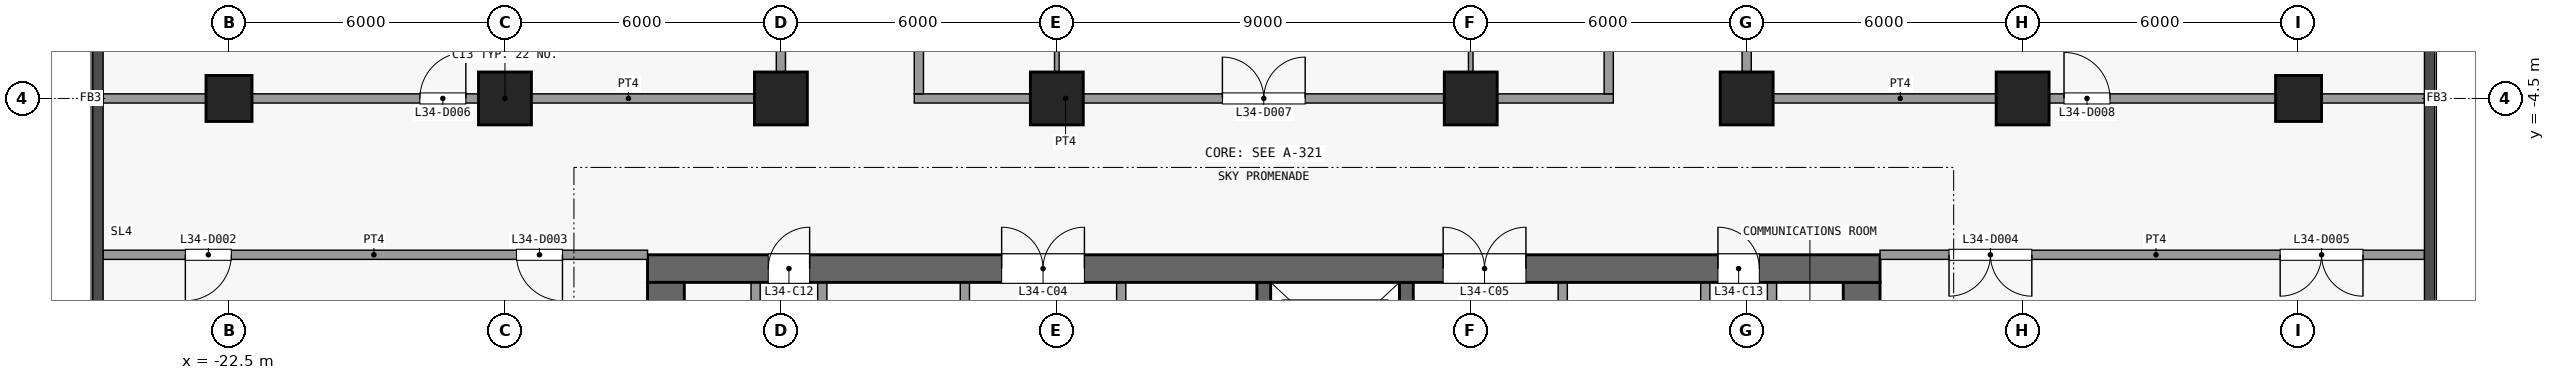
"""IFC4 building model, lengths in metres.
Left out: names, types, materials, properties, quantities, classifications, styles, units other than length and angle.
Written with IfcOpenShell. Run it as: python <this file> out.ifc"""

import sys

from ifc_helpers import new_model, si_unit, direction, frame, frame_2d, origin, origin_2d, place, context, subcontext, project, spatial, rectangle, extrude, element, fill, save


model = new_model("IFC4")
c1 = context("Model", 3, precision=1e-05, world=origin(), true_north=direction((0.0, 1.0)))
c2 = subcontext(c1, "Body", "Model", "MODEL_VIEW")
j1 = project(units=[si_unit("LENGTHUNIT", "METRE"), si_unit("PLANEANGLEUNIT", "RADIAN")], contexts=[c1])
p1 = place(None, origin())
s1 = spatial("IfcSite", under=j1, at=p1, CompositionType="ELEMENT")
p2 = place(p1, origin())
s2 = spatial("IfcBuilding", under=s1, at=p2, CompositionType="ELEMENT")
p3 = place(p2, frame((0.0, 0.0, 138.9)))
s3 = spatial("IfcBuildingStorey", under=s2, at=p3, CompositionType="ELEMENT", Elevation=138.9)
p4 = place(p3, frame((-22.5, -4.5, 0.0), z_axis=(0.0, 0.0, 1.0), x_axis=(1.0, 0.0, 0.0)))
e1 = element("IfcColumn", 1, at=p4, inside=s3, PredefinedType="COLUMN", context=c2, shape_type="SweptSolid", body=[
    extrude(rectangle(XDim=1.0, YDim=1.0, at=origin_2d()), origin(), (0.0, 0.0, 1.0), 5.0),
])
for number, where, z_axis, x_axis in (
    (2, (-16.5, -4.5, 0.0), (0.0, 0.0, 1.0), (1.0, 0.0, 0.0)),
    (3, (-10.5, -4.5, 0.0), (0.0, 0.0, 1.0), (1.0, 0.0, 0.0)),
    (4, (-4.5, -4.5, 0.0), (0.0, 0.0, 1.0), (1.0, 0.0, 0.0)),
    (5, (4.5, -4.5, 0.0), (0.0, 0.0, 1.0), (1.0, 0.0, 0.0)),
    (6, (10.5, -4.5, 0.0), (0.0, 0.0, 1.0), (1.0, 0.0, 0.0)),
    (7, (16.5, -4.5, 0.0), (0.0, 0.0, 1.0), (1.0, 0.0, 0.0)),
):
    element("IfcColumn", number, at=place(p3, frame(where, z_axis=z_axis, x_axis=x_axis)), inside=s3, PredefinedType="COLUMN", context=c2, shape_type="SweptSolid", body=[
        extrude(rectangle(XDim=1.15, YDim=1.15, at=origin_2d()), origin(), (0.0, 0.0, 1.0), 5.0),
    ])
p5 = place(p3, frame((22.5, -4.5, 0.0), z_axis=(0.0, 0.0, 1.0), x_axis=(1.0, 0.0, 0.0)))
e8 = element("IfcColumn", 8, at=p5, inside=s3, PredefinedType="COLUMN", context=c2, shape_type="SweptSolid", body=[
    extrude(rectangle(XDim=1.0, YDim=1.0, at=origin_2d()), origin(), (0.0, 0.0, 1.0), 5.0),
])
p6 = place(p3, frame((-13.4, -8.2, 0.0), z_axis=(0.0, 0.0, 1.0), x_axis=(1.0, 0.0, 0.0)))
e9 = element("IfcWall", 9, at=p6, inside=s3, PredefinedType="SHEAR", context=c2, shape_type="SweptSolid", body=[
    extrude(rectangle(XDim=26.8, YDim=0.6, at=frame_2d((13.4, 0.0))), origin(), (0.0, 0.0, 1.0), 4.55),
])
p7 = place(p6, frame((7.7, 0.0, 0.0)))
e10 = element("IfcOpeningElement", 10, at=p7, cuts=e9, PredefinedType="OPENING", context=c2, shape_type="SweptSolid", body=[
    extrude(rectangle(XDim=1.8, YDim=2.1, at=frame_2d((0.9, 1.05))), frame((0.0, 0.31, 0.0), z_axis=(0.0, -1.0, 0.0), x_axis=(1.0, 0.0, 0.0)), (0.0, 0.0, 1.0), 0.62),
])
p8 = place(p6, frame((17.3, 0.0, 0.0)))
e11 = element("IfcOpeningElement", 11, at=p8, cuts=e9, PredefinedType="OPENING", context=c2, shape_type="SweptSolid", body=[
    extrude(rectangle(XDim=1.8, YDim=2.1, at=frame_2d((0.9, 1.05))), frame((0.0, 0.31, 0.0), z_axis=(0.0, -1.0, 0.0), x_axis=(1.0, 0.0, 0.0)), (0.0, 0.0, 1.0), 0.62),
])
p9 = place(p6, frame((2.625, 0.0, 0.0)))
e12 = element("IfcOpeningElement", 12, at=p9, cuts=e9, PredefinedType="OPENING", context=c2, shape_type="SweptSolid", body=[
    extrude(rectangle(XDim=0.9, YDim=2.1, at=frame_2d((0.45, 1.05))), frame((0.0, 0.31, 0.0), z_axis=(0.0, -1.0, 0.0), x_axis=(1.0, 0.0, 0.0)), (0.0, 0.0, 1.0), 0.62),
])
p10 = place(p6, frame((23.275, 0.0, 0.0)))
e13 = element("IfcOpeningElement", 13, at=p10, cuts=e9, PredefinedType="OPENING", context=c2, shape_type="SweptSolid", body=[
    extrude(rectangle(XDim=0.9, YDim=2.1, at=frame_2d((0.45, 1.05))), frame((0.0, 0.31, 0.0), z_axis=(0.0, -1.0, 0.0), x_axis=(1.0, 0.0, 0.0)), (0.0, 0.0, 1.0), 0.62),
])
for number, where, z_axis, x_axis in (
    (14, (-13.0, -24.6, 0.0), (0.0, 0.0, 1.0), (0.0, 1.0, 0.0)),
    (15, (13.0, -24.6, 0.0), (0.0, 0.0, 1.0), (0.0, 1.0, 0.0)),
):
    element("IfcWall", number, at=place(p3, frame(where, z_axis=z_axis, x_axis=x_axis)), inside=s3, PredefinedType="SHEAR", context=c2, shape_type="SweptSolid", body=[
        extrude(rectangle(XDim=16.1, YDim=0.8, at=frame_2d((8.05, 0.0))), origin(), (0.0, 0.0, 1.0), 4.55),
    ])
p11 = place(p3, frame((-11.05, -13.4, 0.0), z_axis=(0.0, 0.0, 1.0), x_axis=(0.0, 1.0, 0.0)))
e16 = element("IfcWall", 16, at=p11, inside=s3, PredefinedType="PARTITIONING", context=c2, shape_type="SweptSolid", body=[
    extrude(rectangle(XDim=4.9, YDim=0.2, at=frame_2d((2.45, 0.0))), origin(), (0.0, 0.0, 1.0), 4.55),
])
p12 = place(p11, frame((2.05, 0.0, 0.0)))
e17 = element("IfcOpeningElement", 17, at=p12, cuts=e16, PredefinedType="OPENING", context=c2, shape_type="SweptSolid", body=[
    extrude(rectangle(XDim=0.9, YDim=2.1, at=frame_2d((0.45, 1.05))), frame((0.0, 0.11, 0.0), z_axis=(0.0, -1.0, 0.0), x_axis=(1.0, 0.0, 0.0)), (0.0, 0.0, 1.0), 0.22),
])
p13 = place(p3, frame((-9.6, -11.18, 0.0), z_axis=(0.0, 0.0, 1.0), x_axis=(0.0, 1.0, 0.0)))
e18 = element("IfcWall", 18, at=p13, inside=s3, PredefinedType="PARTITIONING", context=c2, shape_type="SweptSolid", body=[
    extrude(rectangle(XDim=2.68, YDim=0.2, at=frame_2d((1.34, 0.0))), origin(), (0.0, 0.0, 1.0), 4.55),
])
p14 = place(p3, frame((-6.5, -11.18, 0.0), z_axis=(0.0, 0.0, 1.0), x_axis=(0.0, 1.0, 0.0)))
e19 = element("IfcWall", 19, at=p14, inside=s3, PredefinedType="PARTITIONING", context=c2, shape_type="SweptSolid", body=[
    extrude(rectangle(XDim=2.68, YDim=0.2, at=frame_2d((1.34, 0.0))), origin(), (0.0, 0.0, 1.0), 4.55),
])
p15 = place(p14, frame((0.84, 0.0, 0.0)))
e20 = element("IfcOpeningElement", 20, at=p15, cuts=e19, PredefinedType="OPENING", context=c2, shape_type="SweptSolid", body=[
    extrude(rectangle(XDim=0.9, YDim=2.1, at=frame_2d((0.45, 1.05))), frame((0.0, 0.11, 0.0), z_axis=(0.0, -1.0, 0.0), x_axis=(1.0, 0.0, 0.0)), (0.0, 0.0, 1.0), 0.22),
])
p16 = place(p3, frame((-3.1, -8.5, 0.0), z_axis=(0.0, 0.0, 1.0), x_axis=(0.0, -1.0, 0.0)))
e21 = element("IfcWall", 21, at=p16, inside=s3, PredefinedType="PARTITIONING", context=c2, shape_type="SweptSolid", body=[
    extrude(rectangle(XDim=10.97, YDim=0.2, at=frame_2d((5.485, 0.0))), origin(), (0.0, 0.0, 1.0), 4.55),
])
p17 = place(p16, frame((4.96, 0.0, 0.0)))
e22 = element("IfcOpeningElement", 22, at=p17, cuts=e21, PredefinedType="OPENING", context=c2, shape_type="SweptSolid", body=[
    extrude(rectangle(XDim=1.2, YDim=2.1, at=frame_2d((0.6, 1.05))), frame((0.0, 0.11, 0.0), z_axis=(0.0, -1.0, 0.0), x_axis=(1.0, 0.0, 0.0)), (0.0, 0.0, 1.0), 0.22),
])
p18 = place(p3, frame((0.0, -22.25, 0.0), z_axis=(0.0, 0.0, 1.0), x_axis=(0.0, 1.0, 0.0)))
e23 = element("IfcWall", 23, at=p18, inside=s3, PredefinedType="SHEAR", context=c2, shape_type="SweptSolid", body=[
    extrude(rectangle(XDim=13.75, YDim=0.3, at=frame_2d((6.875, 0.0))), origin(), (0.0, 0.0, 1.0), 4.55),
])
p19 = place(p3, frame((3.1, -22.55, 0.0), z_axis=(0.0, 0.0, 1.0), x_axis=(0.0, 1.0, 0.0)))
e24 = element("IfcWall", 24, at=p19, inside=s3, PredefinedType="SHEAR", context=c2, shape_type="SweptSolid", body=[
    extrude(rectangle(XDim=14.05, YDim=0.3, at=frame_2d((7.025, 0.0))), origin(), (0.0, 0.0, 1.0), 4.55),
])
p20 = place(p19, frame((1.05, 0.0, 0.0)))
e25 = element("IfcOpeningElement", 25, at=p20, cuts=e24, PredefinedType="OPENING", context=c2, shape_type="SweptSolid", body=[
    extrude(rectangle(XDim=1.1, YDim=2.1, at=frame_2d((0.55, 1.05))), frame((0.0, 0.16, 0.0), z_axis=(0.0, -1.0, 0.0), x_axis=(1.0, 0.0, 0.0)), (0.0, 0.0, 1.0), 0.32),
])
p21 = place(p19, frame((3.875, 0.0, 0.0)))
e26 = element("IfcOpeningElement", 26, at=p21, cuts=e24, PredefinedType="OPENING", context=c2, shape_type="SweptSolid", body=[
    extrude(rectangle(XDim=1.1, YDim=2.1, at=frame_2d((0.55, 1.05))), frame((0.0, 0.16, 0.0), z_axis=(0.0, -1.0, 0.0), x_axis=(1.0, 0.0, 0.0)), (0.0, 0.0, 1.0), 0.32),
])
p22 = place(p19, frame((6.625, 0.0, 0.0)))
e27 = element("IfcOpeningElement", 27, at=p22, cuts=e24, PredefinedType="OPENING", context=c2, shape_type="SweptSolid", body=[
    extrude(rectangle(XDim=1.1, YDim=2.1, at=frame_2d((0.55, 1.05))), frame((0.0, 0.16, 0.0), z_axis=(0.0, -1.0, 0.0), x_axis=(1.0, 0.0, 0.0)), (0.0, 0.0, 1.0), 0.32),
])
p23 = place(p19, frame((9.375, 0.0, 0.0)))
e28 = element("IfcOpeningElement", 28, at=p23, cuts=e24, PredefinedType="OPENING", context=c2, shape_type="SweptSolid", body=[
    extrude(rectangle(XDim=1.1, YDim=2.1, at=frame_2d((0.55, 1.05))), frame((0.0, 0.16, 0.0), z_axis=(0.0, -1.0, 0.0), x_axis=(1.0, 0.0, 0.0)), (0.0, 0.0, 1.0), 0.32),
])
p24 = place(p19, frame((12.125, 0.0, 0.0)))
e29 = element("IfcOpeningElement", 29, at=p24, cuts=e24, PredefinedType="OPENING", context=c2, shape_type="SweptSolid", body=[
    extrude(rectangle(XDim=1.1, YDim=2.1, at=frame_2d((0.55, 1.05))), frame((0.0, 0.16, 0.0), z_axis=(0.0, -1.0, 0.0), x_axis=(1.0, 0.0, 0.0)), (0.0, 0.0, 1.0), 0.32),
])
p25 = place(p3, frame((6.5, -8.5, 0.0), z_axis=(0.0, 0.0, 1.0), x_axis=(0.0, -1.0, 0.0)))
e30 = element("IfcWall", 30, at=p25, inside=s3, PredefinedType="PARTITIONING", context=c2, shape_type="SweptSolid", body=[
    extrude(rectangle(XDim=10.85, YDim=0.2, at=frame_2d((5.425, 0.0))), origin(), (0.0, 0.0, 1.0), 4.55),
])
p26 = place(p25, frame((4.9, 0.0, 0.0)))
e31 = element("IfcOpeningElement", 31, at=p26, cuts=e30, PredefinedType="OPENING", context=c2, shape_type="SweptSolid", body=[
    extrude(rectangle(XDim=1.2, YDim=2.1, at=frame_2d((0.6, 1.05))), frame((0.0, 0.11, 0.0), z_axis=(0.0, -1.0, 0.0), x_axis=(1.0, 0.0, 0.0)), (0.0, 0.0, 1.0), 0.22),
])
p27 = place(p3, frame((9.6, -16.9, 0.0), z_axis=(0.0, 0.0, 1.0), x_axis=(0.0, 1.0, 0.0)))
e32 = element("IfcWall", 32, at=p27, inside=s3, PredefinedType="PARTITIONING", context=c2, shape_type="SweptSolid", body=[
    extrude(rectangle(XDim=8.4, YDim=0.2, at=frame_2d((4.2, 0.0))), origin(), (0.0, 0.0, 1.0), 4.55),
])
p28 = place(p3, frame((11.05, -8.5, 0.0), z_axis=(0.0, 0.0, 1.0), x_axis=(0.0, -1.0, 0.0)))
e33 = element("IfcWall", 33, at=p28, inside=s3, PredefinedType="PARTITIONING", context=c2, shape_type="SweptSolid", body=[
    extrude(rectangle(XDim=2.2, YDim=0.2, at=frame_2d((1.1, 0.0))), origin(), (0.0, 0.0, 1.0), 4.55),
])
p29 = place(p28, frame((0.6, 0.0, 0.0)))
e34 = element("IfcOpeningElement", 34, at=p29, cuts=e33, PredefinedType="OPENING", context=c2, shape_type="SweptSolid", body=[
    extrude(rectangle(XDim=0.9, YDim=2.1, at=frame_2d((0.45, 1.05))), frame((0.0, 0.11, 0.0), z_axis=(0.0, -1.0, 0.0), x_axis=(1.0, 0.0, 0.0)), (0.0, 0.0, 1.0), 0.22),
])
p30 = place(p3, frame((-25.238, -7.9, 0.0), z_axis=(0.0, 0.0, 1.0), x_axis=(1.0, 0.0, 0.0)))
e35 = element("IfcWall", 35, at=p30, inside=s3, PredefinedType="PARTITIONING", context=c2, shape_type="SweptSolid", body=[
    extrude(rectangle(XDim=11.838, YDim=0.2, at=frame_2d((5.919, 0.0))), origin(), (0.0, 0.0, 1.0), 4.55),
])
p31 = place(p30, frame((1.788, 0.0, 0.0)))
e36 = element("IfcOpeningElement", 36, at=p31, cuts=e35, PredefinedType="OPENING", context=c2, shape_type="SweptSolid", body=[
    extrude(rectangle(XDim=1.0, YDim=2.1, at=frame_2d((0.5, 1.05))), frame((0.0, 0.11, 0.0), z_axis=(0.0, -1.0, 0.0), x_axis=(1.0, 0.0, 0.0)), (0.0, 0.0, 1.0), 0.22),
])
p32 = place(p30, frame((8.988, 0.0, 0.0)))
e37 = element("IfcOpeningElement", 37, at=p32, cuts=e35, PredefinedType="OPENING", context=c2, shape_type="SweptSolid", body=[
    extrude(rectangle(XDim=1.0, YDim=2.1, at=frame_2d((0.5, 1.05))), frame((0.0, 0.11, 0.0), z_axis=(0.0, -1.0, 0.0), x_axis=(1.0, 0.0, 0.0)), (0.0, 0.0, 1.0), 0.22),
])
p33 = place(p3, frame((13.4, -7.9, 0.0), z_axis=(0.0, 0.0, 1.0), x_axis=(1.0, 0.0, 0.0)))
e38 = element("IfcWall", 38, at=p33, inside=s3, PredefinedType="PARTITIONING", context=c2, shape_type="SweptSolid", body=[
    extrude(rectangle(XDim=11.838, YDim=0.2, at=frame_2d((5.919, 0.0))), origin(), (0.0, 0.0, 1.0), 4.55),
])
p34 = place(p33, frame((1.5, 0.0, 0.0)))
e39 = element("IfcOpeningElement", 39, at=p34, cuts=e38, PredefinedType="OPENING", context=c2, shape_type="SweptSolid", body=[
    extrude(rectangle(XDim=1.8, YDim=2.1, at=frame_2d((0.9, 1.05))), frame((0.0, 0.11, 0.0), z_axis=(0.0, -1.0, 0.0), x_axis=(1.0, 0.0, 0.0)), (0.0, 0.0, 1.0), 0.22),
])
p35 = place(p33, frame((8.7, 0.0, 0.0)))
e40 = element("IfcOpeningElement", 40, at=p35, cuts=e38, PredefinedType="OPENING", context=c2, shape_type="SweptSolid", body=[
    extrude(rectangle(XDim=1.8, YDim=2.1, at=frame_2d((0.9, 1.05))), frame((0.0, 0.11, 0.0), z_axis=(0.0, -1.0, 0.0), x_axis=(1.0, 0.0, 0.0)), (0.0, 0.0, 1.0), 0.22),
])
p36 = place(p3, frame((-25.238, -4.5, 0.0), z_axis=(0.0, 0.0, 1.0), x_axis=(1.0, 0.0, 0.0)))
e41 = element("IfcWall", 41, at=p36, inside=s3, PredefinedType="PARTITIONING", context=c2, shape_type="SweptSolid", body=[
    extrude(rectangle(XDim=14.838, YDim=0.2, at=frame_2d((7.419, 0.0))), origin(), (0.0, 0.0, 1.0), 4.55),
])
p37 = place(p36, frame((6.887, 0.0, 0.0)))
e42 = element("IfcOpeningElement", 42, at=p37, cuts=e41, PredefinedType="OPENING", context=c2, shape_type="SweptSolid", body=[
    extrude(rectangle(XDim=1.0, YDim=2.1, at=frame_2d((0.5, 1.05))), frame((0.0, 0.11, 0.0), z_axis=(0.0, -1.0, 0.0), x_axis=(1.0, 0.0, 0.0)), (0.0, 0.0, 1.0), 0.22),
])
p38 = place(p3, frame((-7.6, -4.5, 0.0), z_axis=(0.0, 0.0, 1.0), x_axis=(1.0, 0.0, 0.0)))
e43 = element("IfcWall", 43, at=p38, inside=s3, PredefinedType="PARTITIONING", context=c2, shape_type="SweptSolid", body=[
    extrude(rectangle(XDim=15.2, YDim=0.2, at=frame_2d((7.6, 0.0))), origin(), (0.0, 0.0, 1.0), 4.55),
])
p39 = place(p38, frame((6.7, 0.0, 0.0)))
e44 = element("IfcOpeningElement", 44, at=p39, cuts=e43, PredefinedType="OPENING", context=c2, shape_type="SweptSolid", body=[
    extrude(rectangle(XDim=1.8, YDim=2.1, at=frame_2d((0.9, 1.05))), frame((0.0, 0.11, 0.0), z_axis=(0.0, -1.0, 0.0), x_axis=(1.0, 0.0, 0.0)), (0.0, 0.0, 1.0), 0.22),
])
p40 = place(p3, frame((10.4, -4.5, 0.0), z_axis=(0.0, 0.0, 1.0), x_axis=(1.0, 0.0, 0.0)))
e45 = element("IfcWall", 45, at=p40, inside=s3, PredefinedType="PARTITIONING", context=c2, shape_type="SweptSolid", body=[
    extrude(rectangle(XDim=14.838, YDim=0.2, at=frame_2d((7.419, 0.0))), origin(), (0.0, 0.0, 1.0), 4.55),
])
p41 = place(p40, frame((7.0, 0.0, 0.0)))
e46 = element("IfcOpeningElement", 46, at=p41, cuts=e45, PredefinedType="OPENING", context=c2, shape_type="SweptSolid", body=[
    extrude(rectangle(XDim=1.0, YDim=2.1, at=frame_2d((0.5, 1.05))), frame((0.0, 0.11, 0.0), z_axis=(0.0, -1.0, 0.0), x_axis=(1.0, 0.0, 0.0)), (0.0, 0.0, 1.0), 0.22),
])
p42 = place(p3, frame((-10.5, -4.4, 0.0), z_axis=(0.0, 0.0, 1.0), x_axis=(0.0, 1.0, 0.0)))
e47 = element("IfcWall", 47, at=p42, inside=s3, PredefinedType="PARTITIONING", context=c2, shape_type="SweptSolid", body=[
    extrude(rectangle(XDim=11.8, YDim=0.2, at=frame_2d((5.9, 0.0))), origin(), (0.0, 0.0, 1.0), 4.55),
])
p43 = place(p3, frame((-7.5, -4.4, 0.0), z_axis=(0.0, 0.0, 1.0), x_axis=(0.0, 1.0, 0.0)))
e48 = element("IfcWall", 48, at=p43, inside=s3, PredefinedType="PARTITIONING", context=c2, shape_type="SweptSolid", body=[
    extrude(rectangle(XDim=11.8, YDim=0.2, at=frame_2d((5.9, 0.0))), origin(), (0.0, 0.0, 1.0), 4.55),
])
p44 = place(p43, frame((5.4, 0.0, 0.0)))
e49 = element("IfcOpeningElement", 49, at=p44, cuts=e48, PredefinedType="OPENING", context=c2, shape_type="SweptSolid", body=[
    extrude(rectangle(XDim=1.0, YDim=2.1, at=frame_2d((0.5, 1.05))), frame((0.0, 0.11, 0.0), z_axis=(0.0, -1.0, 0.0), x_axis=(1.0, 0.0, 0.0)), (0.0, 0.0, 1.0), 0.22),
])
for number, where, z_axis, x_axis in (
    (50, (-4.5, -4.4, 0.0), (0.0, 0.0, 1.0), (0.0, 1.0, 0.0)),
    (51, (4.5, -4.4, 0.0), (0.0, 0.0, 1.0), (0.0, 1.0, 0.0)),
):
    element("IfcWall", number, at=place(p3, frame(where, z_axis=z_axis, x_axis=x_axis)), inside=s3, PredefinedType="PARTITIONING", context=c2, shape_type="SweptSolid", body=[
        extrude(rectangle(XDim=11.8, YDim=0.1, at=frame_2d((5.9, 0.0))), origin(), (0.0, 0.0, 1.0), 4.55),
    ])
p45 = place(p3, frame((7.5, -4.4, 0.0), z_axis=(0.0, 0.0, 1.0), x_axis=(0.0, 1.0, 0.0)))
e52 = element("IfcWall", 52, at=p45, inside=s3, PredefinedType="PARTITIONING", context=c2, shape_type="SweptSolid", body=[
    extrude(rectangle(XDim=11.8, YDim=0.2, at=frame_2d((5.9, 0.0))), origin(), (0.0, 0.0, 1.0), 4.55),
])
p46 = place(p45, frame((5.4, 0.0, 0.0)))
e53 = element("IfcOpeningElement", 53, at=p46, cuts=e52, PredefinedType="OPENING", context=c2, shape_type="SweptSolid", body=[
    extrude(rectangle(XDim=1.0, YDim=2.1, at=frame_2d((0.5, 1.05))), frame((0.0, 0.11, 0.0), z_axis=(0.0, -1.0, 0.0), x_axis=(1.0, 0.0, 0.0)), (0.0, 0.0, 1.0), 0.22),
])
p47 = place(p3, frame((10.5, -4.4, 0.0), z_axis=(0.0, 0.0, 1.0), x_axis=(0.0, 1.0, 0.0)))
e54 = element("IfcWall", 54, at=p47, inside=s3, PredefinedType="PARTITIONING", context=c2, shape_type="SweptSolid", body=[
    extrude(rectangle(XDim=11.8, YDim=0.2, at=frame_2d((5.9, 0.0))), origin(), (0.0, 0.0, 1.0), 4.55),
])
p48 = place(p7, origin())
e55 = element("IfcDoor", 55, at=p48, inside=s3, OperationType="DOUBLE_DOOR_SINGLE_SWING", PredefinedType="DOOR", context=c2, shape_type="SweptSolid", body=[
    extrude(rectangle(XDim=1.8, YDim=2.1, at=frame_2d((0.9, 1.05))), frame((0.0, 0.025, 0.0), z_axis=(0.0, -1.0, 0.0), x_axis=(1.0, 0.0, 0.0)), (0.0, 0.0, 1.0), 0.05),
])
fill(e10, e55)
p49 = place(p8, origin())
e56 = element("IfcDoor", 56, at=p49, inside=s3, OperationType="DOUBLE_DOOR_SINGLE_SWING", PredefinedType="DOOR", context=c2, shape_type="SweptSolid", body=[
    extrude(rectangle(XDim=1.8, YDim=2.1, at=frame_2d((0.9, 1.05))), frame((0.0, 0.025, 0.0), z_axis=(0.0, -1.0, 0.0), x_axis=(1.0, 0.0, 0.0)), (0.0, 0.0, 1.0), 0.05),
])
fill(e11, e56)
p50 = place(p9, origin())
e57 = element("IfcDoor", 57, at=p50, inside=s3, OperationType="SINGLE_SWING_RIGHT", PredefinedType="DOOR", context=c2, shape_type="SweptSolid", body=[
    extrude(rectangle(XDim=0.9, YDim=2.1, at=frame_2d((0.45, 1.05))), frame((0.0, 0.025, 0.0), z_axis=(0.0, -1.0, 0.0), x_axis=(1.0, 0.0, 0.0)), (0.0, 0.0, 1.0), 0.05),
])
fill(e12, e57)
p51 = place(p10, origin())
e58 = element("IfcDoor", 58, at=p51, inside=s3, OperationType="SINGLE_SWING_LEFT", PredefinedType="DOOR", context=c2, shape_type="SweptSolid", body=[
    extrude(rectangle(XDim=0.9, YDim=2.1, at=frame_2d((0.45, 1.05))), frame((0.0, 0.025, 0.0), z_axis=(0.0, -1.0, 0.0), x_axis=(1.0, 0.0, 0.0)), (0.0, 0.0, 1.0), 0.05),
])
fill(e13, e58)
p52 = place(p31, origin())
e59 = element("IfcDoor", 59, at=p52, inside=s3, OperationType="SINGLE_SWING_LEFT", PredefinedType="DOOR", context=c2, shape_type="SweptSolid", body=[
    extrude(rectangle(XDim=1.0, YDim=2.1, at=frame_2d((0.5, 1.05))), frame((0.0, 0.025, 0.0), z_axis=(0.0, -1.0, 0.0), x_axis=(1.0, 0.0, 0.0)), (0.0, 0.0, 1.0), 0.05),
])
fill(e36, e59)
p53 = place(p32, origin())
e60 = element("IfcDoor", 60, at=p53, inside=s3, OperationType="SINGLE_SWING_RIGHT", PredefinedType="DOOR", context=c2, shape_type="SweptSolid", body=[
    extrude(rectangle(XDim=1.0, YDim=2.1, at=frame_2d((0.5, 1.05))), frame((0.0, 0.025, 0.0), z_axis=(0.0, -1.0, 0.0), x_axis=(1.0, 0.0, 0.0)), (0.0, 0.0, 1.0), 0.05),
])
fill(e37, e60)
p54 = place(p34, origin())
e61 = element("IfcDoor", 61, at=p54, inside=s3, OperationType="DOUBLE_DOOR_SINGLE_SWING", PredefinedType="DOOR", context=c2, shape_type="SweptSolid", body=[
    extrude(rectangle(XDim=1.8, YDim=2.1, at=frame_2d((0.9, 1.05))), frame((0.0, 0.025, 0.0), z_axis=(0.0, -1.0, 0.0), x_axis=(1.0, 0.0, 0.0)), (0.0, 0.0, 1.0), 0.05),
])
fill(e39, e61)
p55 = place(p35, origin())
e62 = element("IfcDoor", 62, at=p55, inside=s3, OperationType="DOUBLE_DOOR_SINGLE_SWING", PredefinedType="DOOR", context=c2, shape_type="SweptSolid", body=[
    extrude(rectangle(XDim=1.8, YDim=2.1, at=frame_2d((0.9, 1.05))), frame((0.0, 0.025, 0.0), z_axis=(0.0, -1.0, 0.0), x_axis=(1.0, 0.0, 0.0)), (0.0, 0.0, 1.0), 0.05),
])
fill(e40, e62)
p56 = place(p37, origin())
e63 = element("IfcDoor", 63, at=p56, inside=s3, OperationType="SINGLE_SWING_LEFT", PredefinedType="DOOR", context=c2, shape_type="SweptSolid", body=[
    extrude(rectangle(XDim=1.0, YDim=2.1, at=frame_2d((0.5, 1.05))), frame((0.0, 0.025, 0.0), z_axis=(0.0, -1.0, 0.0), x_axis=(1.0, 0.0, 0.0)), (0.0, 0.0, 1.0), 0.05),
])
fill(e42, e63)
p57 = place(p39, origin())
e64 = element("IfcDoor", 64, at=p57, inside=s3, OperationType="DOUBLE_DOOR_SINGLE_SWING", PredefinedType="DOOR", context=c2, shape_type="SweptSolid", body=[
    extrude(rectangle(XDim=1.8, YDim=2.1, at=frame_2d((0.9, 1.05))), frame((0.0, 0.025, 0.0), z_axis=(0.0, -1.0, 0.0), x_axis=(1.0, 0.0, 0.0)), (0.0, 0.0, 1.0), 0.05),
])
fill(e44, e64)
p58 = place(p41, origin())
e65 = element("IfcDoor", 65, at=p58, inside=s3, OperationType="SINGLE_SWING_RIGHT", PredefinedType="DOOR", context=c2, shape_type="SweptSolid", body=[
    extrude(rectangle(XDim=1.0, YDim=2.1, at=frame_2d((0.5, 1.05))), frame((0.0, 0.025, 0.0), z_axis=(0.0, -1.0, 0.0), x_axis=(1.0, 0.0, 0.0)), (0.0, 0.0, 1.0), 0.05),
])
fill(e46, e65)
save(model, sys.argv[1])
